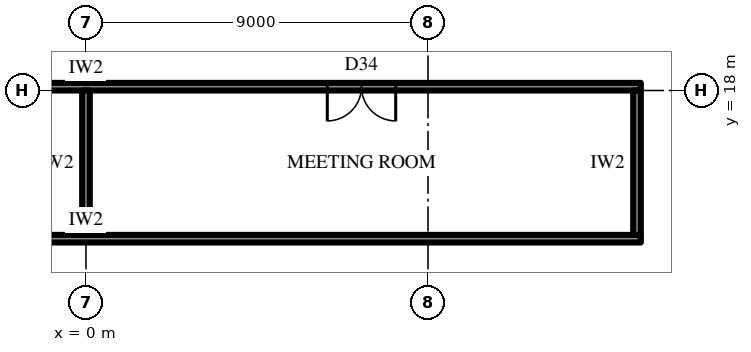
"""IFC4 building model, lengths in metres.
Left out: names, types, materials, properties, quantities, classifications, styles, units other than length and angle.
Written with IfcOpenShell. Run it as: python <this file> out.ifc"""

import sys

from ifc_helpers import new_model, si_unit, direction, frame, frame_2d, origin, place, context, subcontext, project, spatial, rectangle, extrude, element, fill, save


model = new_model("IFC4")
c1 = context("Model", 3, precision=1e-05, world=origin(), true_north=direction((0.0, 1.0)))
c2 = subcontext(c1, "Body", "Model", "MODEL_VIEW")
j1 = project(units=[si_unit("LENGTHUNIT", "METRE"), si_unit("PLANEANGLEUNIT", "RADIAN")], contexts=[c1])
p1 = place(None, origin())
s1 = spatial("IfcSite", under=j1, at=p1, CompositionType="ELEMENT")
p2 = place(p1, origin())
s2 = spatial("IfcBuilding", under=s1, at=p2, CompositionType="ELEMENT")
p3 = place(p2, frame((0.0, 0.0, 274.3)))
s3 = spatial("IfcBuildingStorey", under=s2, at=p3, CompositionType="ELEMENT", Elevation=274.3)
p4 = place(p3, frame((-14.6, 14.1, 0.0), z_axis=(0.0, 0.0, 1.0), x_axis=(1.0, 0.0, 0.0)))
e1 = element("IfcWall", 1, at=p4, inside=s3, PredefinedType="PARTITIONING", context=c2, shape_type="SweptSolid", body=[
    extrude(rectangle(XDim=29.2, YDim=0.2, at=frame_2d((14.6, 0.0))), origin(), (0.0, 0.0, 1.0), 4.0),
])
p5 = place(p3, frame((-14.6, 18.1, 0.0), z_axis=(0.0, 0.0, 1.0), x_axis=(1.0, 0.0, 0.0)))
e2 = element("IfcWall", 2, at=p5, inside=s3, PredefinedType="PARTITIONING", context=c2, shape_type="SweptSolid", body=[
    extrude(rectangle(XDim=29.2, YDim=0.2, at=frame_2d((14.6, 0.0))), origin(), (0.0, 0.0, 1.0), 4.0),
])
p6 = place(p5, frame((6.45, 0.0, 0.0)))
e3 = element("IfcOpeningElement", 3, at=p6, cuts=e2, PredefinedType="OPENING", context=c2, shape_type="SweptSolid", body=[
    extrude(rectangle(XDim=1.8, YDim=2.4, at=frame_2d((0.9, 1.2))), frame((0.0, 0.11, 0.0), z_axis=(0.0, -1.0, 0.0), x_axis=(1.0, 0.0, 0.0)), (0.0, 0.0, 1.0), 0.22),
])
p7 = place(p5, frame((20.95, 0.0, 0.0)))
e4 = element("IfcOpeningElement", 4, at=p7, cuts=e2, PredefinedType="OPENING", context=c2, shape_type="SweptSolid", body=[
    extrude(rectangle(XDim=1.8, YDim=2.4, at=frame_2d((0.9, 1.2))), frame((0.0, 0.11, 0.0), z_axis=(0.0, -1.0, 0.0), x_axis=(1.0, 0.0, 0.0)), (0.0, 0.0, 1.0), 0.22),
])
p8 = place(p3, frame((0.0, 14.2, 0.0), z_axis=(0.0, 0.0, 1.0), x_axis=(0.0, 1.0, 0.0)))
e5 = element("IfcWall", 5, at=p8, inside=s3, PredefinedType="PARTITIONING", context=c2, shape_type="SweptSolid", body=[
    extrude(rectangle(XDim=3.8, YDim=0.2, at=frame_2d((1.9, 0.0))), origin(), (0.0, 0.0, 1.0), 2.992),
])
p9 = place(p3, frame((14.5, 14.2, 0.0), z_axis=(0.0, 0.0, 1.0), x_axis=(0.0, 1.0, 0.0)))
e6 = element("IfcWall", 6, at=p9, inside=s3, PredefinedType="PARTITIONING", context=c2, shape_type="SweptSolid", body=[
    extrude(rectangle(XDim=3.8, YDim=0.2, at=frame_2d((1.9, 0.0))), origin(), (0.0, 0.0, 1.0), 4.0),
])
p10 = place(p7, frame((1.8, 0.0, 0.0), z_axis=(0.0, 0.0, 1.0), x_axis=(-1.0, 0.0, 0.0)))
e7 = element("IfcDoor", 7, at=p10, inside=s3, OperationType="DOUBLE_DOOR_SINGLE_SWING", PredefinedType="DOOR", context=c2, shape_type="SweptSolid", body=[
    extrude(rectangle(XDim=1.8, YDim=2.4, at=frame_2d((0.9, 1.2))), frame((0.0, 0.025, 0.0), z_axis=(0.0, -1.0, 0.0), x_axis=(1.0, 0.0, 0.0)), (0.0, 0.0, 1.0), 0.05),
])
fill(e4, e7)
save(model, sys.argv[1])
